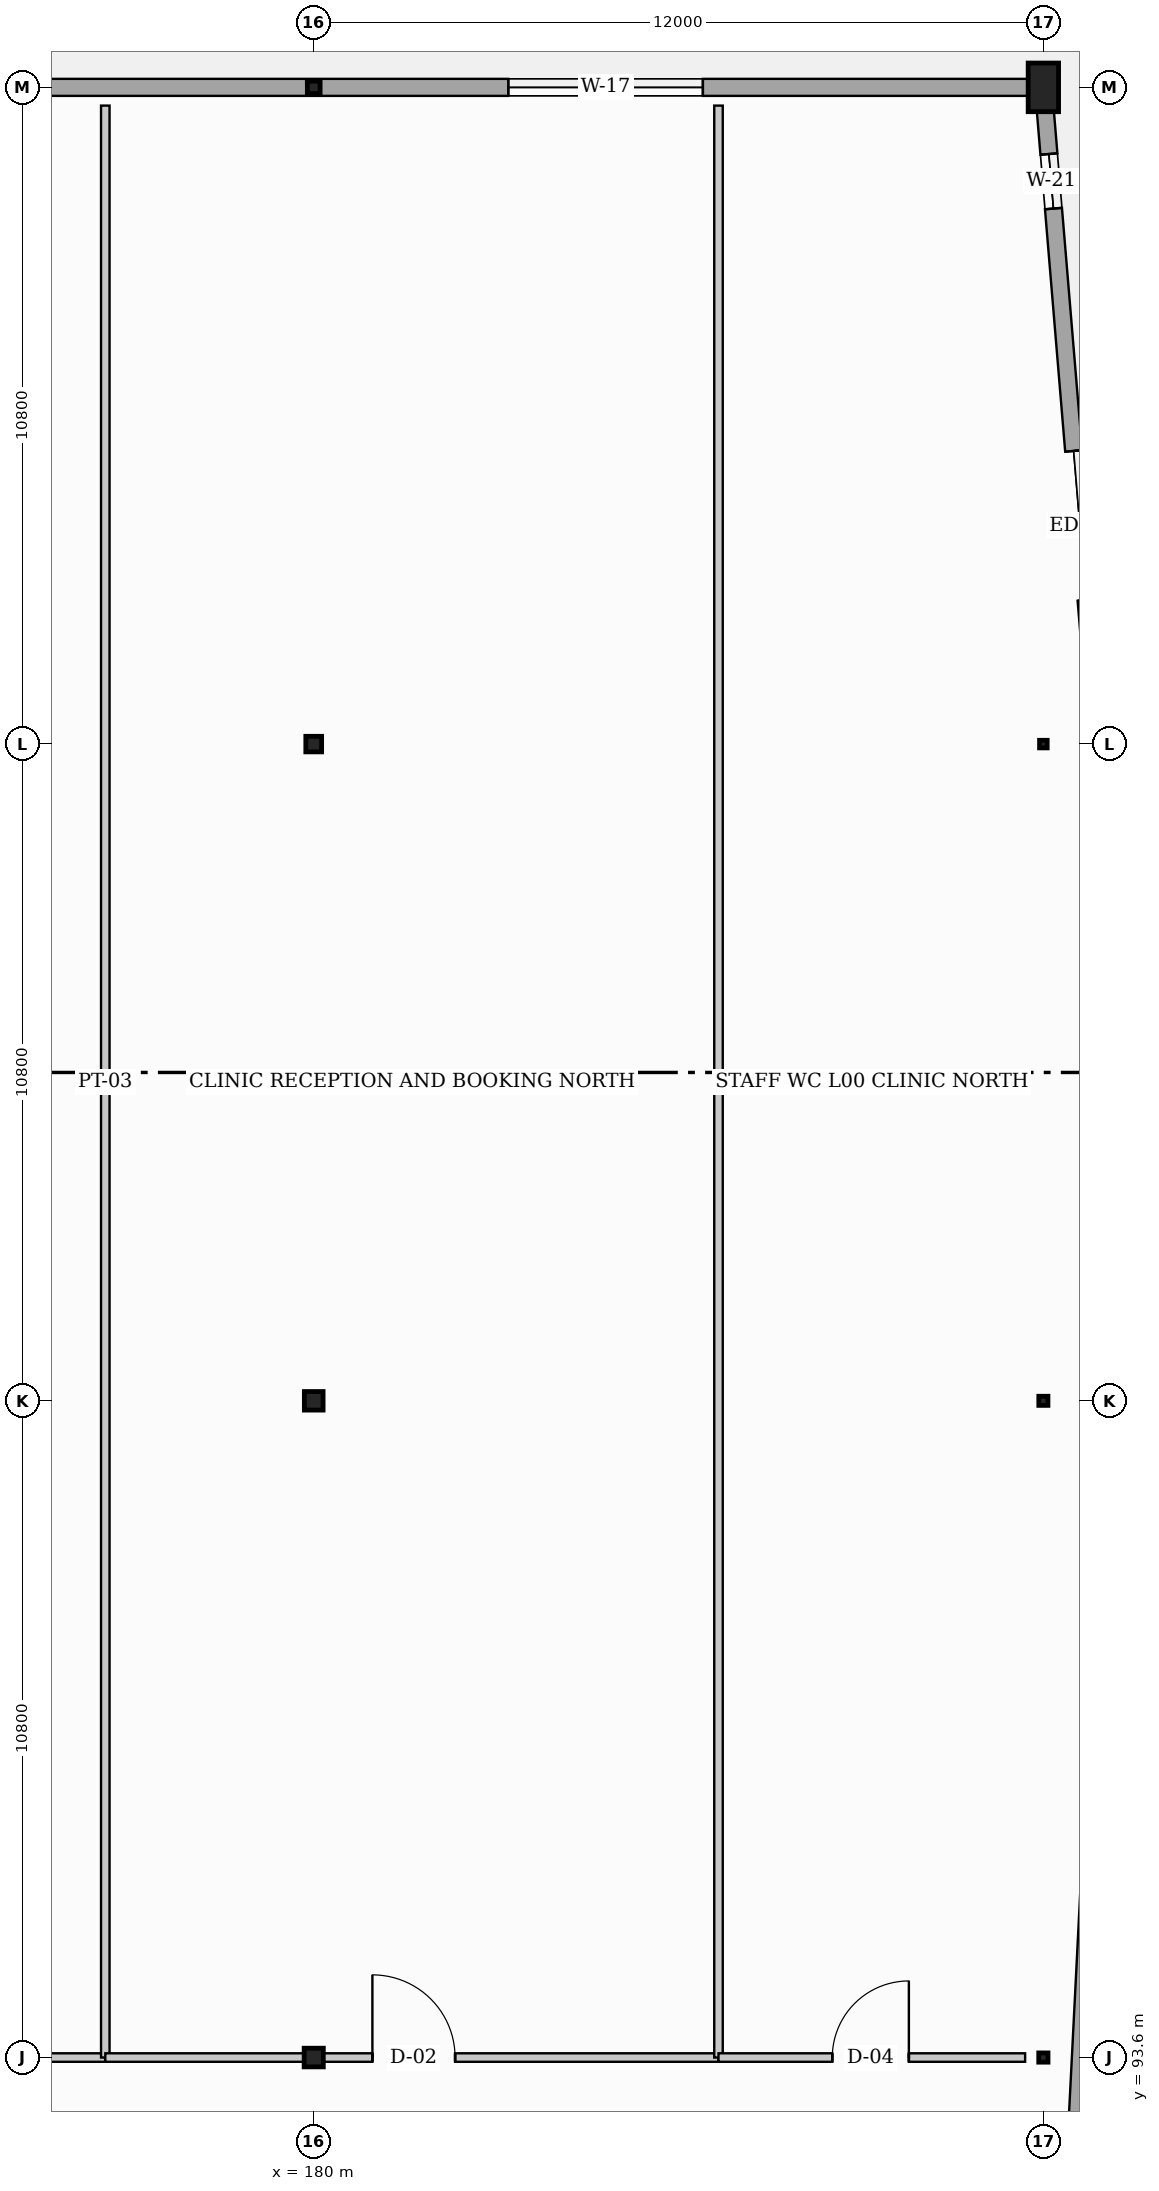
"""IFC4 building model, lengths in metres.
Left out: names, types, materials, properties, quantities, classifications, styles, units other than length and angle.
Written with IfcOpenShell. Run it as: python <this file> out.ifc"""

import sys

from ifc_helpers import new_model, si_unit, direction, frame, frame_2d, origin, origin_2d, place, context, subcontext, project, spatial, rectangle, hollow_rectangle, i_section, extrude, element, fill, save


model = new_model("IFC4")
c1 = context("Model", 3, precision=1e-05, world=origin(), true_north=direction((0.0, 1.0)))
c2 = subcontext(c1, "Body", "Model", "MODEL_VIEW")
j1 = project(units=[si_unit("LENGTHUNIT", "METRE"), si_unit("PLANEANGLEUNIT", "RADIAN")], contexts=[c1])
p1 = place(None, origin())
s1 = spatial("IfcSite", under=j1, at=p1, CompositionType="ELEMENT")
p2 = place(p1, origin())
s2 = spatial("IfcBuilding", under=s1, at=p2, CompositionType="ELEMENT")
p3 = place(p2, origin())
s3 = spatial("IfcBuildingStorey", under=s2, at=p3, CompositionType="ELEMENT", Elevation=0.0)
p4 = place(p3, frame((180.0, 93.6, 0.0), z_axis=(0.0, 0.0, 1.0), x_axis=(0.0, 1.0, 0.0)))
e1 = element("IfcColumn", 1, at=p4, inside=s3, PredefinedType="COLUMN", context=c2, shape_type="SweptSolid", body=[
    extrude(i_section(OverallWidth=0.307, OverallDepth=0.315, WebThickness=0.012, FlangeThickness=0.019, at=origin_2d()), origin(), (0.0, 0.0, 1.0), 4.8),
])
p5 = place(p3, frame((180.0, 104.4, 0.0), z_axis=(0.0, 0.0, 1.0), x_axis=(0.0, 1.0, 0.0)))
e2 = element("IfcColumn", 2, at=p5, inside=s3, PredefinedType="COLUMN", context=c2, shape_type="SweptSolid", body=[
    extrude(i_section(OverallWidth=0.305, OverallDepth=0.308, WebThickness=0.01, FlangeThickness=0.015, at=origin_2d()), origin(), (0.0, 0.0, 1.0), 4.8),
])
p6 = place(p3, frame((180.0, 115.2, 0.0), z_axis=(0.0, 0.0, 1.0), x_axis=(0.0, 1.0, 0.0)))
e3 = element("IfcColumn", 3, at=p6, inside=s3, PredefinedType="COLUMN", context=c2, shape_type="SweptSolid", body=[
    extrude(i_section(OverallWidth=0.256, OverallDepth=0.26, WebThickness=0.01, FlangeThickness=0.017, at=origin_2d()), origin(), (0.0, 0.0, 1.0), 4.8),
])
p7 = place(p3, frame((180.0, 126.0, 0.0), z_axis=(0.0, 0.0, 1.0), x_axis=(0.0, 1.0, 0.0)))
e4 = element("IfcColumn", 4, at=p7, inside=s3, PredefinedType="COLUMN", context=c2, shape_type="SweptSolid", body=[
    extrude(i_section(OverallWidth=0.205, OverallDepth=0.21, WebThickness=0.009, FlangeThickness=0.014, at=origin_2d()), origin(), (0.0, 0.0, 1.0), 4.8),
])
p8 = place(p3, frame((192.0, 93.6, 0.0), z_axis=(0.0, 0.0, 1.0), x_axis=(1.0, 0.0, 0.0)))
e5 = element("IfcColumn", 5, at=p8, inside=s3, PredefinedType="COLUMN", context=c2, shape_type="SweptSolid", body=[
    extrude(i_section(OverallWidth=0.152, OverallDepth=0.152, WebThickness=0.006, FlangeThickness=0.007, at=origin_2d()), origin(), (0.0, 0.0, 1.0), 4.8),
])
p9 = place(p3, frame((192.0, 104.4, 0.0), z_axis=(0.0, 0.0, 1.0), x_axis=(1.0, 0.0, 0.0)))
e6 = element("IfcColumn", 6, at=p9, inside=s3, PredefinedType="COLUMN", context=c2, shape_type="SweptSolid", body=[
    extrude(hollow_rectangle(XDim=0.15, YDim=0.15, WallThickness=0.008, at=origin_2d()), origin(), (0.0, 0.0, 1.0), 4.8),
])
p10 = place(p3, frame((192.0, 115.2, 0.0), z_axis=(0.0, 0.0, 1.0), x_axis=(1.0, 0.0, 0.0)))
e7 = element("IfcColumn", 7, at=p10, inside=s3, PredefinedType="COLUMN", context=c2, shape_type="SweptSolid", body=[
    extrude(hollow_rectangle(XDim=0.125, YDim=0.125, WallThickness=0.006, at=origin_2d()), origin(), (0.0, 0.0, 1.0), 4.8),
])
p11 = place(p3, frame((192.0, 126.0, 0.0), z_axis=(0.0, 0.0, 1.0), x_axis=(1.0, 0.0, 0.0)))
e8 = element("IfcColumn", 8, at=p11, inside=s3, PredefinedType="PILASTER", context=c2, shape_type="SweptSolid", body=[
    extrude(rectangle(XDim=0.5, YDim=0.8, at=origin_2d()), origin(), (0.0, 0.0, 1.0), 4.8),
])
p12 = place(p3, frame((168.0, 126.0, 0.0), z_axis=(0.0, 0.0, 1.0), x_axis=(1.0, 0.0, 0.0)))
e9 = element("IfcWall", 9, at=p12, inside=s3, PredefinedType="STANDARD", context=c2, shape_type="SweptSolid", body=[
    extrude(rectangle(XDim=24.0, YDim=0.28, at=frame_2d((12.0, 0.0))), origin(), (0.0, 0.0, 1.0), 3.53),
])
p13 = place(p12, frame((4.5, 0.0, 0.0)))
e10 = element("IfcOpeningElement", 10, at=p13, cuts=e9, PredefinedType="OPENING", context=c2, shape_type="SweptSolid", body=[
    extrude(rectangle(XDim=2.3, YDim=2.3, at=frame_2d((1.15, 1.15))), frame((0.0, 0.15, 0.0), z_axis=(0.0, -1.0, 0.0), x_axis=(1.0, 0.0, 0.0)), (0.0, 0.0, 1.0), 0.3),
])
p14 = place(p12, frame((0.671, 0.0, 0.0)))
e11 = element("IfcOpeningElement", 11, at=p14, cuts=e9, PredefinedType="OPENING", context=c2, shape_type="SweptSolid", body=[
    extrude(rectangle(XDim=2.3, YDim=2.3, at=frame_2d((1.15, 1.15))), frame((0.0, 0.15, 0.0), z_axis=(0.0, -1.0, 0.0), x_axis=(1.0, 0.0, 0.0)), (0.0, 0.0, 1.0), 0.3),
])
p15 = place(p12, frame((15.2, 0.0, 0.95)))
e12 = element("IfcOpeningElement", 12, at=p15, cuts=e9, PredefinedType="OPENING", context=c2, shape_type="SweptSolid", body=[
    extrude(rectangle(XDim=3.2, YDim=2.1, at=frame_2d((1.6, 1.05))), frame((0.0, 0.15, 0.0), z_axis=(0.0, -1.0, 0.0), x_axis=(1.0, 0.0, 0.0)), (0.0, 0.0, 1.0), 0.3),
])
p16 = place(p3, frame((192.0, 126.0, 0.0), z_axis=(0.0, 0.0, 1.0), x_axis=(0.083039487322, -0.996546257604, 0.0)))
e13 = element("IfcWall", 13, at=p16, inside=s3, PredefinedType="STANDARD", context=c2, shape_type="SweptSolid", body=[
    extrude(rectangle(XDim=16.858, YDim=0.28, at=frame_2d((8.429, 0.0))), origin(), (0.0, 0.0, 1.0), 4.13),
])
p17 = place(p16, frame((6.0, 0.0, 0.0)))
e14 = element("IfcOpeningElement", 14, at=p17, cuts=e13, PredefinedType="OPENING", context=c2, shape_type="SweptSolid", body=[
    extrude(rectangle(XDim=2.46, YDim=2.4, at=frame_2d((1.23, 1.2))), frame((0.0, 0.15, 0.0), z_axis=(0.0, -1.0, 0.0), x_axis=(1.0, 0.0, 0.0)), (0.0, 0.0, 1.0), 0.3),
])
p18 = place(p16, frame((1.1, 0.0, 0.95)))
e15 = element("IfcOpeningElement", 15, at=p18, cuts=e13, PredefinedType="OPENING", context=c2, shape_type="SweptSolid", body=[
    extrude(rectangle(XDim=0.9, YDim=1.8, at=frame_2d((0.45, 0.9))), frame((0.0, 0.15, 0.0), z_axis=(0.0, -1.0, 0.0), x_axis=(1.0, 0.0, 0.0)), (0.0, 0.0, 1.0), 0.3),
])
p19 = place(p16, frame((11.9, 0.0, 0.95)))
e16 = element("IfcOpeningElement", 16, at=p19, cuts=e13, PredefinedType="OPENING", context=c2, shape_type="SweptSolid", body=[
    extrude(rectangle(XDim=0.9, YDim=1.8, at=frame_2d((0.45, 0.9))), frame((0.0, 0.15, 0.0), z_axis=(0.0, -1.0, 0.0), x_axis=(1.0, 0.0, 0.0)), (0.0, 0.0, 1.0), 0.3),
])
p20 = place(p3, frame((193.4, 109.2, 0.0), z_axis=(0.0, 0.0, 1.0), x_axis=(-0.050656249881, -0.998716148036, 0.0)))
e17 = element("IfcWall", 17, at=p20, inside=s3, PredefinedType="STANDARD", context=c2, shape_type="SweptSolid", body=[
    extrude(rectangle(XDim=27.635, YDim=0.28, at=frame_2d((13.818, 0.0))), origin(), (0.0, 0.0, 1.0), 3.973),
])
p21 = place(p20, frame((17.2, 0.0, 0.0)))
e18 = element("IfcOpeningElement", 18, at=p21, cuts=e17, PredefinedType="OPENING", context=c2, shape_type="SweptSolid", body=[
    extrude(rectangle(XDim=2.46, YDim=2.4, at=frame_2d((1.23, 1.2))), frame((0.0, 0.15, 0.0), z_axis=(0.0, -1.0, 0.0), x_axis=(1.0, 0.0, 0.0)), (0.0, 0.0, 1.0), 0.3),
])
p22 = place(p20, frame((1.1, 0.0, 0.95)))
e19 = element("IfcOpeningElement", 19, at=p22, cuts=e17, PredefinedType="OPENING", context=c2, shape_type="SweptSolid", body=[
    extrude(rectangle(XDim=0.9, YDim=1.8, at=frame_2d((0.45, 0.9))), frame((0.0, 0.15, 0.0), z_axis=(0.0, -1.0, 0.0), x_axis=(1.0, 0.0, 0.0)), (0.0, 0.0, 1.0), 0.3),
])
p23 = place(p20, frame((4.7, 0.0, 0.95)))
e20 = element("IfcOpeningElement", 20, at=p23, cuts=e17, PredefinedType="OPENING", context=c2, shape_type="SweptSolid", body=[
    extrude(rectangle(XDim=0.9, YDim=1.8, at=frame_2d((0.45, 0.9))), frame((0.0, 0.15, 0.0), z_axis=(0.0, -1.0, 0.0), x_axis=(1.0, 0.0, 0.0)), (0.0, 0.0, 1.0), 0.3),
])
p24 = place(p20, frame((8.3, 0.0, 0.95)))
e21 = element("IfcOpeningElement", 21, at=p24, cuts=e17, PredefinedType="OPENING", context=c2, shape_type="SweptSolid", body=[
    extrude(rectangle(XDim=0.9, YDim=1.8, at=frame_2d((0.45, 0.9))), frame((0.0, 0.15, 0.0), z_axis=(0.0, -1.0, 0.0), x_axis=(1.0, 0.0, 0.0)), (0.0, 0.0, 1.0), 0.3),
])
p25 = place(p20, frame((11.9, 0.0, 0.95)))
e22 = element("IfcOpeningElement", 22, at=p25, cuts=e17, PredefinedType="OPENING", context=c2, shape_type="SweptSolid", body=[
    extrude(rectangle(XDim=0.9, YDim=1.8, at=frame_2d((0.45, 0.9))), frame((0.0, 0.15, 0.0), z_axis=(0.0, -1.0, 0.0), x_axis=(1.0, 0.0, 0.0)), (0.0, 0.0, 1.0), 0.3),
])
p26 = place(p20, frame((22.7, 0.0, 0.95)))
e23 = element("IfcOpeningElement", 23, at=p26, cuts=e17, PredefinedType="OPENING", context=c2, shape_type="SweptSolid", body=[
    extrude(rectangle(XDim=0.9, YDim=1.8, at=frame_2d((0.45, 0.9))), frame((0.0, 0.15, 0.0), z_axis=(0.0, -1.0, 0.0), x_axis=(1.0, 0.0, 0.0)), (0.0, 0.0, 1.0), 0.3),
])
p27 = place(p3, frame((170.8, 93.6, 0.0), z_axis=(0.0, 0.0, 1.0), x_axis=(1.0, 0.0, 0.0)))
e24 = element("IfcWall", 24, at=p27, inside=s3, PredefinedType="PARTITIONING", context=c2, shape_type="SweptSolid", body=[
    extrude(rectangle(XDim=5.772, YDim=0.14, at=frame_2d((2.886, 0.0))), origin(), (0.0, 0.0, 1.0), 3.973),
])
p28 = place(p27, frame((2.236, 0.0, 0.0)))
e25 = element("IfcOpeningElement", 25, at=p28, cuts=e24, PredefinedType="OPENING", context=c2, shape_type="SweptSolid", body=[
    extrude(rectangle(XDim=1.48, YDim=2.26, at=frame_2d((0.74, 1.13))), frame((0.0, 0.08, 0.0), z_axis=(0.0, -1.0, 0.0), x_axis=(1.0, 0.0, 0.0)), (0.0, 0.0, 1.0), 0.16),
])
p29 = place(p3, frame((176.572, 93.6, 0.0), z_axis=(0.0, 0.0, 1.0), x_axis=(0.0, 1.0, 0.0)))
e26 = element("IfcWall", 26, at=p29, inside=s3, PredefinedType="PARTITIONING", context=c2, shape_type="SweptSolid", body=[
    extrude(rectangle(XDim=32.1, YDim=0.14, at=frame_2d((16.05, 0.0))), origin(), (0.0, 0.0, 1.0), 3.48),
])
p30 = place(p3, frame((176.572, 93.6, 0.0), z_axis=(0.0, 0.0, 1.0), x_axis=(1.0, 0.0, 0.0)))
e27 = element("IfcWall", 27, at=p30, inside=s3, PredefinedType="PARTITIONING", context=c2, shape_type="SweptSolid", body=[
    extrude(rectangle(XDim=10.085, YDim=0.14, at=frame_2d((5.042, 0.0))), origin(), (0.0, 0.0, 1.0), 3.53),
])
p31 = place(p30, frame((4.393, 0.0, 0.0)))
e28 = element("IfcOpeningElement", 28, at=p31, cuts=e27, PredefinedType="OPENING", context=c2, shape_type="SweptSolid", body=[
    extrude(rectangle(XDim=1.36, YDim=2.18, at=frame_2d((0.68, 1.09))), frame((0.0, 0.08, 0.0), z_axis=(0.0, -1.0, 0.0), x_axis=(1.0, 0.0, 0.0)), (0.0, 0.0, 1.0), 0.16),
])
p32 = place(p3, frame((186.657, 93.6, 0.0), z_axis=(0.0, 0.0, 1.0), x_axis=(0.0, 1.0, 0.0)))
e29 = element("IfcWall", 29, at=p32, inside=s3, PredefinedType="PARTITIONING", context=c2, shape_type="SweptSolid", body=[
    extrude(rectangle(XDim=32.1, YDim=0.14, at=frame_2d((16.05, 0.0))), origin(), (0.0, 0.0, 1.0), 3.48),
])
p33 = place(p3, frame((186.657, 93.6, 0.0), z_axis=(0.0, 0.0, 1.0), x_axis=(1.0, 0.0, 0.0)))
e30 = element("IfcWall", 30, at=p33, inside=s3, PredefinedType="PARTITIONING", context=c2, shape_type="SweptSolid", body=[
    extrude(rectangle(XDim=5.043, YDim=0.14, at=frame_2d((2.521, 0.0))), origin(), (0.0, 0.0, 1.0), 3.976),
])
p34 = place(p33, frame((1.871, 0.0, 0.0)))
e31 = element("IfcOpeningElement", 31, at=p34, cuts=e30, PredefinedType="OPENING", context=c2, shape_type="SweptSolid", body=[
    extrude(rectangle(XDim=1.26, YDim=2.14, at=frame_2d((0.63, 1.07))), frame((0.0, 0.08, 0.0), z_axis=(0.0, -1.0, 0.0), x_axis=(1.0, 0.0, 0.0)), (0.0, 0.0, 1.0), 0.16),
])
p35 = place(p15, origin())
e32 = element("IfcWindow", 32, at=p35, inside=s3, PartitioningType="TRIPLE_PANEL_VERTICAL", PredefinedType="WINDOW", context=c2, shape_type="SweptSolid", body=[
    extrude(rectangle(XDim=3.2, YDim=2.1, at=frame_2d((1.6, 1.05))), frame((0.0, 0.03, 0.0), z_axis=(0.0, -1.0, 0.0), x_axis=(1.0, 0.0, 0.0)), (0.0, 0.0, 1.0), 0.06),
])
fill(e12, e32)
p36 = place(p17, origin())
e33 = element("IfcDoor", 33, at=p36, inside=s3, OperationType="DOUBLE_DOOR_SINGLE_SWING", PredefinedType="DOOR", context=c2, shape_type="SweptSolid", body=[
    extrude(rectangle(XDim=2.46, YDim=2.4, at=frame_2d((1.23, 1.2))), frame((0.0, 0.025, 0.0), z_axis=(0.0, -1.0, 0.0), x_axis=(1.0, 0.0, 0.0)), (0.0, 0.0, 1.0), 0.05),
])
fill(e14, e33)
p37 = place(p18, origin())
e34 = element("IfcWindow", 34, at=p37, inside=s3, PartitioningType="SINGLE_PANEL", PredefinedType="WINDOW", context=c2, shape_type="SweptSolid", body=[
    extrude(rectangle(XDim=0.9, YDim=1.8, at=frame_2d((0.45, 0.9))), frame((0.0, 0.03, 0.0), z_axis=(0.0, -1.0, 0.0), x_axis=(1.0, 0.0, 0.0)), (0.0, 0.0, 1.0), 0.06),
])
fill(e15, e34)
p38 = place(p31, origin())
e35 = element("IfcDoor", 35, at=p38, inside=s3, OperationType="SINGLE_SWING_LEFT", PredefinedType="DOOR", context=c2, shape_type="SweptSolid", body=[
    extrude(rectangle(XDim=1.36, YDim=2.18, at=frame_2d((0.68, 1.09))), frame((0.0, 0.025, 0.0), z_axis=(0.0, -1.0, 0.0), x_axis=(1.0, 0.0, 0.0)), (0.0, 0.0, 1.0), 0.05),
])
fill(e28, e35)
p39 = place(p34, origin())
e36 = element("IfcDoor", 36, at=p39, inside=s3, OperationType="SINGLE_SWING_RIGHT", PredefinedType="DOOR", context=c2, shape_type="SweptSolid", body=[
    extrude(rectangle(XDim=1.26, YDim=2.14, at=frame_2d((0.63, 1.07))), frame((0.0, 0.025, 0.0), z_axis=(0.0, -1.0, 0.0), x_axis=(1.0, 0.0, 0.0)), (0.0, 0.0, 1.0), 0.05),
])
fill(e31, e36)
save(model, sys.argv[1])
